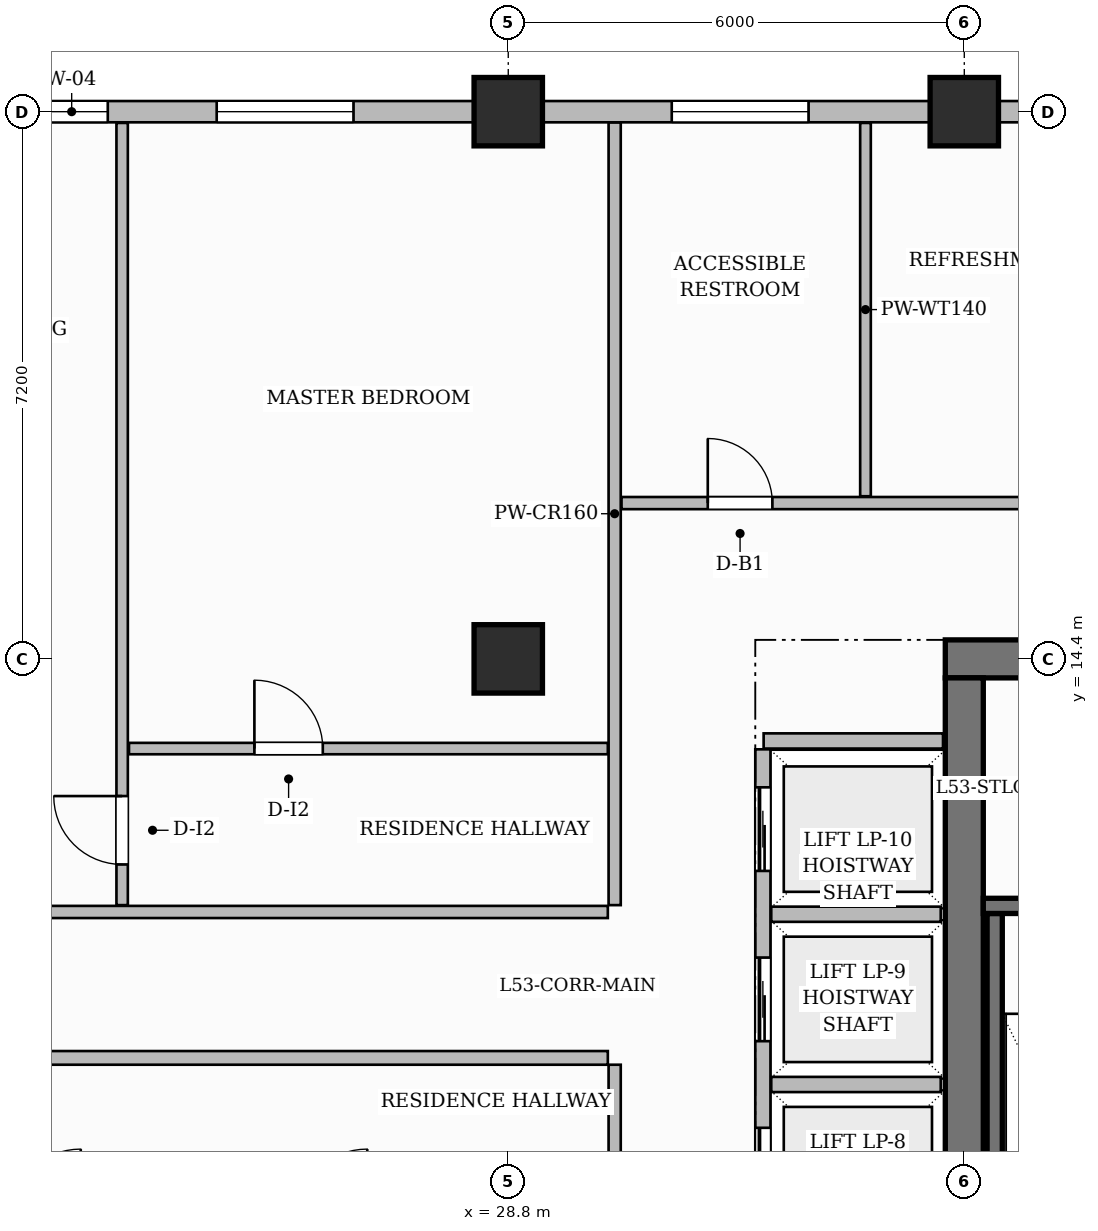
"""IFC4 building model, lengths in metres.
Left out: names, types, materials, properties, quantities, classifications, styles, units other than length and angle.
Written with IfcOpenShell. Run it as: python <this file> out.ifc"""

import sys

from ifc_helpers import new_model, si_unit, direction, frame, frame_2d, origin, origin_2d, place, context, subcontext, project, spatial, rectangle, extrude, source, transform, mapped, element, fill, save


model = new_model("IFC4")
c1 = context("Model", 3, precision=1e-05, world=origin(), true_north=direction((0.0, 1.0)))
c2 = subcontext(c1, "Body", "Model", "MODEL_VIEW")
j1 = project(units=[si_unit("LENGTHUNIT", "METRE"), si_unit("PLANEANGLEUNIT", "RADIAN")], contexts=[c1])
p1 = place(None, origin())
s1 = spatial("IfcSite", under=j1, at=p1, CompositionType="ELEMENT")
p2 = place(p1, origin())
s2 = spatial("IfcBuilding", under=s1, at=p2, CompositionType="ELEMENT")
p3 = place(p2, frame((0.0, 0.0, 213.45)))
s3 = spatial("IfcBuildingStorey", under=s2, at=p3, CompositionType="ELEMENT", Elevation=213.45)
p4 = place(p3, frame((34.55, 14.4, 0.0), z_axis=(0.0, 0.0, 1.0), x_axis=(1.0, 0.0, 0.0)))
e1 = element("IfcWall", 1, at=p4, inside=s3, PredefinedType="SHEAR", context=c2, shape_type="SweptSolid", body=[
    extrude(rectangle(XDim=15.5, YDim=0.5, at=frame_2d((7.75, 0.0))), origin(), (0.0, 0.0, 1.0), 3.85),
])
p5 = place(p4, frame((5.38, 0.0, 0.0)))
e2 = element("IfcOpeningElement", 2, at=p5, cuts=e1, PredefinedType="OPENING", context=c2, shape_type="SweptSolid", body=[
    extrude(rectangle(XDim=1.5, YDim=2.2, at=frame_2d((0.75, 1.1))), frame((0.0, 0.26, 0.0), z_axis=(0.0, -1.0, 0.0), x_axis=(1.0, 0.0, 0.0)), (0.0, 0.0, 1.0), 0.52),
])
p6 = place(p4, frame((1.595, 0.0, 0.0)))
e3 = element("IfcOpeningElement", 3, at=p6, cuts=e1, PredefinedType="OPENING", context=c2, shape_type="SweptSolid", body=[
    extrude(rectangle(XDim=1.05, YDim=2.15, at=frame_2d((0.525, 1.075))), frame((0.0, 0.26, 0.0), z_axis=(0.0, -1.0, 0.0), x_axis=(1.0, 0.0, 0.0)), (0.0, 0.0, 1.0), 0.52),
])
p7 = place(p4, frame((11.225, 0.0, 0.0)))
e4 = element("IfcOpeningElement", 4, at=p7, cuts=e1, PredefinedType="OPENING", context=c2, shape_type="SweptSolid", body=[
    extrude(rectangle(XDim=1.05, YDim=2.15, at=frame_2d((0.525, 1.075))), frame((0.0, 0.26, 0.0), z_axis=(0.0, -1.0, 0.0), x_axis=(1.0, 0.0, 0.0)), (0.0, 0.0, 1.0), 0.52),
])
p8 = place(p3, frame((34.8, 3.85, 0.0), z_axis=(0.0, 0.0, 1.0), x_axis=(0.0, 1.0, 0.0)))
e5 = element("IfcWall", 5, at=p8, inside=s3, PredefinedType="SHEAR", context=c2, shape_type="SweptSolid", body=[
    extrude(rectangle(XDim=10.3, YDim=0.5, at=frame_2d((5.15, 0.0))), origin(), (0.0, 0.0, 1.0), 3.85),
])
m1 = source(origin(), c2, "Body", "SweptSolid", [
    extrude(rectangle(XDim=0.9, YDim=0.9, at=origin_2d()), origin(), (0.0, 0.0, 1.0), 3.85),
])
for number, where, z_axis, x_axis in (
    (6, (28.8, 14.4, 0.0), (0.0, 0.0, 1.0), (1.0, 0.0, 0.0)),
    (7, (28.8, 21.6, 0.0), (0.0, 0.0, 1.0), (1.0, 0.0, 0.0)),
    (8, (34.8, 21.6, 0.0), (0.0, 0.0, 1.0), (1.0, 0.0, 0.0)),
):
    element("IfcColumn", number, at=place(p3, frame(where, z_axis=z_axis, x_axis=x_axis)), inside=s3, PredefinedType="COLUMN", context=c2, shape_type="MappedRepresentation", body=[
        mapped(m1, transform((0.0, 0.0, 0.0), scale=1.0)),
    ])
p9 = place(p3, frame((35.2, 4.1, 0.0), z_axis=(0.0, 0.0, 1.0), x_axis=(0.0, 1.0, 0.0)))
e9 = element("IfcWall", 9, at=p9, inside=s3, PredefinedType="SHEAR", context=c2, shape_type="SweptSolid", body=[
    extrude(rectangle(XDim=6.95, YDim=0.2, at=frame_2d((3.475, 0.0))), origin(), (0.0, 0.0, 1.0), 3.85),
])
p10 = place(p3, frame((35.05, 11.15, 0.0), z_axis=(0.0, 0.0, 1.0), x_axis=(1.0, 0.0, 0.0)))
e10 = element("IfcWall", 10, at=p10, inside=s3, PredefinedType="SHEAR", context=c2, shape_type="SweptSolid", body=[
    extrude(rectangle(XDim=3.19, YDim=0.2, at=frame_2d((1.595, 0.0))), origin(), (0.0, 0.0, 1.0), 3.85),
])
p11 = place(p10, frame((1.095, 0.0, 0.0)))
e11 = element("IfcOpeningElement", 11, at=p11, cuts=e10, PredefinedType="OPENING", context=c2, shape_type="SweptSolid", body=[
    extrude(rectangle(XDim=1.05, YDim=2.2, at=frame_2d((0.525, 1.1))), frame((0.0, 0.11, 0.0), z_axis=(0.0, -1.0, 0.0), x_axis=(1.0, 0.0, 0.0)), (0.0, 0.0, 1.0), 0.22),
])
p12 = place(p3, frame((32.16, 13.32, 0.0), z_axis=(0.0, 0.0, 1.0), x_axis=(1.0, 0.0, 0.0)))
e12 = element("IfcWall", 12, at=p12, inside=s3, PredefinedType="PARTITIONING", context=c2, shape_type="SweptSolid", body=[
    extrude(rectangle(XDim=2.36, YDim=0.2, at=frame_2d((1.18, 0.0))), origin(), (0.0, 0.0, 1.0), 3.6),
])
p13 = place(p3, frame((32.15, 4.39, 0.0), z_axis=(0.0, 0.0, 1.0), x_axis=(0.0, 1.0, 0.0)))
e13 = element("IfcWall", 13, at=p13, inside=s3, PredefinedType="PARTITIONING", context=c2, shape_type="SweptSolid", body=[
    extrude(rectangle(XDim=8.82, YDim=0.2, at=frame_2d((4.41, 0.0))), origin(), (0.0, 0.0, 1.0), 3.6),
])
p14 = place(p13, frame((0.5, 0.0, 0.0)))
e14 = element("IfcOpeningElement", 14, at=p14, cuts=e13, PredefinedType="OPENING", context=c2, shape_type="SweptSolid", body=[
    extrude(rectangle(XDim=1.1, YDim=2.2, at=frame_2d((0.55, 1.1))), frame((0.0, 0.11, 0.0), z_axis=(0.0, -1.0, 0.0), x_axis=(1.0, 0.0, 0.0)), (0.0, 0.0, 1.0), 0.22),
])
p15 = place(p13, frame((2.74, 0.0, 0.0)))
e15 = element("IfcOpeningElement", 15, at=p15, cuts=e13, PredefinedType="OPENING", context=c2, shape_type="SweptSolid", body=[
    extrude(rectangle(XDim=1.1, YDim=2.2, at=frame_2d((0.55, 1.1))), frame((0.0, 0.11, 0.0), z_axis=(0.0, -1.0, 0.0), x_axis=(1.0, 0.0, 0.0)), (0.0, 0.0, 1.0), 0.22),
])
p16 = place(p13, frame((4.98, 0.0, 0.0)))
e16 = element("IfcOpeningElement", 16, at=p16, cuts=e13, PredefinedType="OPENING", context=c2, shape_type="SweptSolid", body=[
    extrude(rectangle(XDim=1.1, YDim=2.2, at=frame_2d((0.55, 1.1))), frame((0.0, 0.11, 0.0), z_axis=(0.0, -1.0, 0.0), x_axis=(1.0, 0.0, 0.0)), (0.0, 0.0, 1.0), 0.22),
])
p17 = place(p13, frame((7.22, 0.0, 0.0)))
e17 = element("IfcOpeningElement", 17, at=p17, cuts=e13, PredefinedType="OPENING", context=c2, shape_type="SweptSolid", body=[
    extrude(rectangle(XDim=1.1, YDim=2.2, at=frame_2d((0.55, 1.1))), frame((0.0, 0.11, 0.0), z_axis=(0.0, -1.0, 0.0), x_axis=(1.0, 0.0, 0.0)), (0.0, 0.0, 1.0), 0.22),
])
for number, where, z_axis, x_axis in (
    (18, (32.26, 8.8, 0.0), (0.0, 0.0, 1.0), (1.0, 0.0, 0.0)),
    (19, (32.26, 11.04, 0.0), (0.0, 0.0, 1.0), (1.0, 0.0, 0.0)),
):
    element("IfcWall", number, at=place(p3, frame(where, z_axis=z_axis, x_axis=x_axis)), inside=s3, PredefinedType="PARTITIONING", context=c2, shape_type="SweptSolid", body=[
        extrude(rectangle(XDim=2.23, YDim=0.2, at=frame_2d((1.115, 0.0))), origin(), (0.0, 0.0, 1.0), 3.6),
    ])
p18 = place(p3, frame((14.548, 9.15, 0.0), z_axis=(0.0, 0.0, 1.0), x_axis=(1.0, 0.0, 0.0)))
e20 = element("IfcWall", 20, at=p18, inside=s3, PredefinedType="PARTITIONING", context=c2, shape_type="SweptSolid", body=[
    extrude(rectangle(XDim=15.562, YDim=0.18, at=frame_2d((7.781, 0.0))), origin(), (0.0, 0.0, 1.0), 3.6),
])
p19 = place(p18, frame((3.082, 0.0, 0.0)))
e21 = element("IfcOpeningElement", 21, at=p19, cuts=e20, PredefinedType="OPENING", context=c2, shape_type="SweptSolid", body=[
    extrude(rectangle(XDim=1.05, YDim=2.25, at=frame_2d((0.525, 1.125))), frame((0.0, 0.1, 0.0), z_axis=(0.0, -1.0, 0.0), x_axis=(1.0, 0.0, 0.0)), (0.0, 0.0, 1.0), 0.2),
])
p20 = place(p3, frame((14.548, 11.07, 0.0), z_axis=(0.0, 0.0, 1.0), x_axis=(1.0, 0.0, 0.0)))
e22 = element("IfcWall", 22, at=p20, inside=s3, PredefinedType="PARTITIONING", context=c2, shape_type="SweptSolid", body=[
    extrude(rectangle(XDim=15.562, YDim=0.16, at=frame_2d((7.781, 0.0))), origin(), (0.0, 0.0, 1.0), 3.6),
])
p21 = place(p20, frame((0.527, 0.0, 0.0)))
e23 = element("IfcOpeningElement", 23, at=p21, cuts=e22, PredefinedType="OPENING", context=c2, shape_type="SweptSolid", body=[
    extrude(rectangle(XDim=1.4, YDim=2.35, at=frame_2d((0.7, 1.175))), frame((0.0, 0.09, 0.0), z_axis=(0.0, -1.0, 0.0), x_axis=(1.0, 0.0, 0.0)), (0.0, 0.0, 1.0), 0.18),
])
p22 = place(p20, frame((6.527, 0.0, 0.0)))
e24 = element("IfcOpeningElement", 24, at=p22, cuts=e22, PredefinedType="OPENING", context=c2, shape_type="SweptSolid", body=[
    extrude(rectangle(XDim=1.05, YDim=2.25, at=frame_2d((0.525, 1.125))), frame((0.0, 0.09, 0.0), z_axis=(0.0, -1.0, 0.0), x_axis=(1.0, 0.0, 0.0)), (0.0, 0.0, 1.0), 0.18),
])
p23 = place(p3, frame((30.2, 11.16, 0.0), z_axis=(0.0, 0.0, 1.0), x_axis=(0.0, 1.0, 0.0)))
e25 = element("IfcWall", 25, at=p23, inside=s3, PredefinedType="PARTITIONING", context=c2, shape_type="SweptSolid", body=[
    extrude(rectangle(XDim=10.3, YDim=0.16, at=frame_2d((5.15, 0.0))), origin(), (0.0, 0.0, 1.0), 3.6),
])
p24 = place(p3, frame((30.29, 16.45, 0.0), z_axis=(0.0, 0.0, 1.0), x_axis=(1.0, 0.0, 0.0)))
e26 = element("IfcWall", 26, at=p24, inside=s3, PredefinedType="PARTITIONING", context=c2, shape_type="SweptSolid", body=[
    extrude(rectangle(XDim=19.37, YDim=0.16, at=frame_2d((9.685, 0.0))), origin(), (0.0, 0.0, 1.0), 3.6),
])
p25 = place(p24, frame((1.135, 0.0, 0.0)))
e27 = element("IfcOpeningElement", 27, at=p25, cuts=e26, PredefinedType="OPENING", context=c2, shape_type="SweptSolid", body=[
    extrude(rectangle(XDim=0.85, YDim=2.1, at=frame_2d((0.425, 1.05))), frame((0.0, 0.09, 0.0), z_axis=(0.0, -1.0, 0.0), x_axis=(1.0, 0.0, 0.0)), (0.0, 0.0, 1.0), 0.18),
])
p26 = place(p24, frame((5.71, 0.0, 0.0)))
e28 = element("IfcOpeningElement", 28, at=p26, cuts=e26, PredefinedType="OPENING", context=c2, shape_type="SweptSolid", body=[
    extrude(rectangle(XDim=0.9, YDim=2.15, at=frame_2d((0.45, 1.075))), frame((0.0, 0.09, 0.0), z_axis=(0.0, -1.0, 0.0), x_axis=(1.0, 0.0, 0.0)), (0.0, 0.0, 1.0), 0.18),
])
p27 = place(p24, frame((10.635, 0.0, 0.0)))
e29 = element("IfcOpeningElement", 29, at=p27, cuts=e26, PredefinedType="OPENING", context=c2, shape_type="SweptSolid", body=[
    extrude(rectangle(XDim=0.95, YDim=2.15, at=frame_2d((0.475, 1.075))), frame((0.0, 0.09, 0.0), z_axis=(0.0, -1.0, 0.0), x_axis=(1.0, 0.0, 0.0)), (0.0, 0.0, 1.0), 0.18),
])
p28 = place(p24, frame((16.235, 0.0, 0.0)))
e30 = element("IfcOpeningElement", 30, at=p28, cuts=e26, PredefinedType="OPENING", context=c2, shape_type="SweptSolid", body=[
    extrude(rectangle(XDim=0.95, YDim=2.15, at=frame_2d((0.475, 1.075))), frame((0.0, 0.09, 0.0), z_axis=(0.0, -1.0, 0.0), x_axis=(1.0, 0.0, 0.0)), (0.0, 0.0, 1.0), 0.18),
])
p29 = place(p3, frame((30.2, 0.148, 0.0), z_axis=(0.0, 0.0, 1.0), x_axis=(0.0, 1.0, 0.0)))
e31 = element("IfcWall", 31, at=p29, inside=s3, PredefinedType="PARTITIONING", context=c2, shape_type="SweptSolid", body=[
    extrude(rectangle(XDim=8.912, YDim=0.16, at=frame_2d((4.456, 0.0))), origin(), (0.0, 0.0, 1.0), 3.6),
])
p30 = place(p29, frame((1.977, 0.0, 0.0)))
e32 = element("IfcOpeningElement", 32, at=p30, cuts=e31, PredefinedType="OPENING", context=c2, shape_type="SweptSolid", body=[
    extrude(rectangle(XDim=1.05, YDim=2.15, at=frame_2d((0.525, 1.075))), frame((0.0, 0.09, 0.0), z_axis=(0.0, -1.0, 0.0), x_axis=(1.0, 0.0, 0.0)), (0.0, 0.0, 1.0), 0.18),
])
p31 = place(p3, frame((33.5, 16.54, 0.0), z_axis=(0.0, 0.0, 1.0), x_axis=(0.0, 1.0, 0.0)))
e33 = element("IfcWall", 33, at=p31, inside=s3, PredefinedType="PARTITIONING", context=c2, shape_type="SweptSolid", body=[
    extrude(rectangle(XDim=4.912, YDim=0.14, at=frame_2d((2.456, 0.0))), origin(), (0.0, 0.0, 1.0), 3.6),
])
p32 = place(p3, frame((23.72, 11.16, 0.0), z_axis=(0.0, 0.0, 1.0), x_axis=(0.0, 1.0, 0.0)))
e34 = element("IfcWall", 34, at=p32, inside=s3, PredefinedType="PARTITIONING", context=c2, shape_type="SweptSolid", body=[
    extrude(rectangle(XDim=10.292, YDim=0.15, at=frame_2d((5.146, 0.0))), origin(), (0.0, 0.0, 1.0), 3.6),
])
p33 = place(p32, frame((0.535, 0.0, 0.0)))
e35 = element("IfcOpeningElement", 35, at=p33, cuts=e34, PredefinedType="OPENING", context=c2, shape_type="SweptSolid", body=[
    extrude(rectangle(XDim=0.9, YDim=2.15, at=frame_2d((0.45, 1.075))), frame((0.0, 0.085, 0.0), z_axis=(0.0, -1.0, 0.0), x_axis=(1.0, 0.0, 0.0)), (0.0, 0.0, 1.0), 0.17),
])
p34 = place(p3, frame((23.81, 13.22, 0.0), z_axis=(0.0, 0.0, 1.0), x_axis=(1.0, 0.0, 0.0)))
e36 = element("IfcWall", 36, at=p34, inside=s3, PredefinedType="PARTITIONING", context=c2, shape_type="SweptSolid", body=[
    extrude(rectangle(XDim=6.3, YDim=0.15, at=frame_2d((3.15, 0.0))), origin(), (0.0, 0.0, 1.0), 3.6),
])
p35 = place(p34, frame((1.65, 0.0, 0.0)))
e37 = element("IfcOpeningElement", 37, at=p35, cuts=e36, PredefinedType="OPENING", context=c2, shape_type="SweptSolid", body=[
    extrude(rectangle(XDim=0.9, YDim=2.15, at=frame_2d((0.45, 1.075))), frame((0.0, 0.085, 0.0), z_axis=(0.0, -1.0, 0.0), x_axis=(1.0, 0.0, 0.0)), (0.0, 0.0, 1.0), 0.17),
])
p36 = place(p3, frame((14.4, 21.6, 0.0), z_axis=(0.0, 0.0, 1.0), x_axis=(1.0, 0.0, 0.0)))
e38 = element("IfcWall", 38, at=p36, inside=s3, PredefinedType="SOLIDWALL", context=c2, shape_type="SweptSolid", body=[
    extrude(rectangle(XDim=35.4, YDim=0.28, at=frame_2d((17.7, 0.0))), origin(), (0.0, 0.0, 1.0), 3.135),
])
p37 = place(p36, frame((1.196, 0.0, 0.8)))
e39 = element("IfcOpeningElement", 39, at=p37, cuts=e38, PredefinedType="OPENING", context=c2, shape_type="SweptSolid", body=[
    extrude(rectangle(XDim=1.15, YDim=1.8, at=frame_2d((0.575, 0.9))), frame((0.0, 0.15, 0.0), z_axis=(0.0, -1.0, 0.0), x_axis=(1.0, 0.0, 0.0)), (0.0, 0.0, 1.0), 0.3),
])
p38 = place(p36, frame((3.679, 0.0, 0.8)))
e40 = element("IfcOpeningElement", 40, at=p38, cuts=e38, PredefinedType="OPENING", context=c2, shape_type="SweptSolid", body=[
    extrude(rectangle(XDim=1.8, YDim=1.85, at=frame_2d((0.9, 0.925))), frame((0.0, 0.15, 0.0), z_axis=(0.0, -1.0, 0.0), x_axis=(1.0, 0.0, 0.0)), (0.0, 0.0, 1.0), 0.3),
])
p39 = place(p36, frame((8.181, 0.0, 0.8)))
e41 = element("IfcOpeningElement", 41, at=p39, cuts=e38, PredefinedType="OPENING", context=c2, shape_type="SweptSolid", body=[
    extrude(rectangle(XDim=0.95, YDim=1.75, at=frame_2d((0.475, 0.875))), frame((0.0, 0.15, 0.0), z_axis=(0.0, -1.0, 0.0), x_axis=(1.0, 0.0, 0.0)), (0.0, 0.0, 1.0), 0.3),
])
p40 = place(p36, frame((10.564, 0.0, 0.8)))
e42 = element("IfcOpeningElement", 42, at=p40, cuts=e38, PredefinedType="OPENING", context=c2, shape_type="SweptSolid", body=[
    extrude(rectangle(XDim=1.8, YDim=1.85, at=frame_2d((0.9, 0.925))), frame((0.0, 0.15, 0.0), z_axis=(0.0, -1.0, 0.0), x_axis=(1.0, 0.0, 0.0)), (0.0, 0.0, 1.0), 0.3),
])
p41 = place(p36, frame((16.551, 0.0, 0.8)))
e43 = element("IfcOpeningElement", 43, at=p41, cuts=e38, PredefinedType="OPENING", context=c2, shape_type="SweptSolid", body=[
    extrude(rectangle(XDim=1.8, YDim=1.85, at=frame_2d((0.9, 0.925))), frame((0.0, 0.15, 0.0), z_axis=(0.0, -1.0, 0.0), x_axis=(1.0, 0.0, 0.0)), (0.0, 0.0, 1.0), 0.3),
])
p42 = place(p36, frame((22.196, 0.0, 0.8)))
e44 = element("IfcOpeningElement", 44, at=p42, cuts=e38, PredefinedType="OPENING", context=c2, shape_type="SweptSolid", body=[
    extrude(rectangle(XDim=1.8, YDim=1.85, at=frame_2d((0.9, 0.925))), frame((0.0, 0.15, 0.0), z_axis=(0.0, -1.0, 0.0), x_axis=(1.0, 0.0, 0.0)), (0.0, 0.0, 1.0), 0.3),
])
p43 = place(p36, frame((25.329, 0.0, 0.8)))
e45 = element("IfcOpeningElement", 45, at=p43, cuts=e38, PredefinedType="OPENING", context=c2, shape_type="SweptSolid", body=[
    extrude(rectangle(XDim=1.15, YDim=1.8, at=frame_2d((0.575, 0.9))), frame((0.0, 0.15, 0.0), z_axis=(0.0, -1.0, 0.0), x_axis=(1.0, 0.0, 0.0)), (0.0, 0.0, 1.0), 0.3),
])
p44 = place(p36, frame((28.721, 0.0, 0.8)))
e46 = element("IfcOpeningElement", 46, at=p44, cuts=e38, PredefinedType="OPENING", context=c2, shape_type="SweptSolid", body=[
    extrude(rectangle(XDim=0.95, YDim=1.75, at=frame_2d((0.475, 0.875))), frame((0.0, 0.15, 0.0), z_axis=(0.0, -1.0, 0.0), x_axis=(1.0, 0.0, 0.0)), (0.0, 0.0, 1.0), 0.3),
])
p45 = place(p36, frame((31.404, 0.0, 0.8)))
e47 = element("IfcOpeningElement", 47, at=p45, cuts=e38, PredefinedType="OPENING", context=c2, shape_type="SweptSolid", body=[
    extrude(rectangle(XDim=1.8, YDim=1.85, at=frame_2d((0.9, 0.925))), frame((0.0, 0.15, 0.0), z_axis=(0.0, -1.0, 0.0), x_axis=(1.0, 0.0, 0.0)), (0.0, 0.0, 1.0), 0.3),
])
m2 = source(origin(), c2, "Body", "SweptSolid", [
    extrude(rectangle(XDim=0.85, YDim=2.1, at=frame_2d((0.425, 1.05))), frame((0.0, 0.025, 0.0), z_axis=(0.0, -1.0, 0.0), x_axis=(1.0, 0.0, 0.0)), (0.0, 0.0, 1.0), 0.05),
])
p46 = place(p25, origin())
e48 = element("IfcDoor", 48, at=p46, inside=s3, OperationType="SINGLE_SWING_LEFT", PredefinedType="DOOR", context=c2, shape_type="MappedRepresentation", body=[
    mapped(m2, transform((0.0, 0.0, 0.0), scale=1.0)),
])
fill(e27, e48)
m3 = source(origin(), c2, "Body", "SweptSolid", [
    extrude(rectangle(XDim=0.9, YDim=2.15, at=frame_2d((0.45, 1.075))), frame((0.0, 0.025, 0.0), z_axis=(0.0, -1.0, 0.0), x_axis=(1.0, 0.0, 0.0)), (0.0, 0.0, 1.0), 0.05),
])
p47 = place(p33, origin())
e49 = element("IfcDoor", 49, at=p47, inside=s3, OperationType="SINGLE_SWING_RIGHT", PredefinedType="DOOR", context=c2, shape_type="MappedRepresentation", body=[
    mapped(m3, transform((0.0, 0.0, 0.0), scale=1.0)),
])
fill(e35, e49)
p48 = place(p35, origin())
e50 = element("IfcDoor", 50, at=p48, inside=s3, OperationType="SINGLE_SWING_LEFT", PredefinedType="DOOR", context=c2, shape_type="MappedRepresentation", body=[
    mapped(m3, transform((0.0, 0.0, 0.0), scale=1.0)),
])
fill(e37, e50)
m4 = source(origin(), c2, "Body", "SweptSolid", [
    extrude(rectangle(XDim=1.1, YDim=2.2, at=frame_2d((0.55, 1.1))), frame((0.0, 0.025, 0.0), z_axis=(0.0, -1.0, 0.0), x_axis=(1.0, 0.0, 0.0)), (0.0, 0.0, 1.0), 0.05),
])
p49 = place(p15, origin())
e51 = element("IfcDoor", 51, at=p49, inside=s3, OperationType="SLIDING_TO_LEFT", PredefinedType="DOOR", context=c2, shape_type="MappedRepresentation", body=[
    mapped(m4, transform((0.0, 0.0, 0.0), scale=1.0)),
])
fill(e15, e51)
p50 = place(p16, origin())
e52 = element("IfcDoor", 52, at=p50, inside=s3, OperationType="SLIDING_TO_LEFT", PredefinedType="DOOR", context=c2, shape_type="MappedRepresentation", body=[
    mapped(m4, transform((0.0, 0.0, 0.0), scale=1.0)),
])
fill(e16, e52)
p51 = place(p17, origin())
e53 = element("IfcDoor", 53, at=p51, inside=s3, OperationType="SLIDING_TO_LEFT", PredefinedType="DOOR", context=c2, shape_type="MappedRepresentation", body=[
    mapped(m4, transform((0.0, 0.0, 0.0), scale=1.0)),
])
fill(e17, e53)
m5 = source(origin(), c2, "Body", "SweptSolid", [
    extrude(rectangle(XDim=0.95, YDim=1.75, at=frame_2d((0.475, 0.875))), frame((0.0, 0.03, 0.0), z_axis=(0.0, -1.0, 0.0), x_axis=(1.0, 0.0, 0.0)), (0.0, 0.0, 1.0), 0.06),
])
p52 = place(p39, origin())
e54 = element("IfcWindow", 54, at=p52, inside=s3, PartitioningType="SINGLE_PANEL", PredefinedType="WINDOW", context=c2, shape_type="MappedRepresentation", body=[
    mapped(m5, transform((0.0, 0.0, 0.0), scale=1.0)),
])
fill(e41, e54)
m6 = source(origin(), c2, "Body", "SweptSolid", [
    extrude(rectangle(XDim=1.8, YDim=1.85, at=frame_2d((0.9, 0.925))), frame((0.0, 0.03, 0.0), z_axis=(0.0, -1.0, 0.0), x_axis=(1.0, 0.0, 0.0)), (0.0, 0.0, 1.0), 0.06),
])
p53 = place(p40, origin())
e55 = element("IfcWindow", 55, at=p53, inside=s3, PartitioningType="DOUBLE_PANEL_VERTICAL", PredefinedType="WINDOW", context=c2, shape_type="MappedRepresentation", body=[
    mapped(m6, transform((0.0, 0.0, 0.0), scale=1.0)),
])
fill(e42, e55)
p54 = place(p41, origin())
e56 = element("IfcWindow", 56, at=p54, inside=s3, PartitioningType="DOUBLE_PANEL_VERTICAL", PredefinedType="WINDOW", context=c2, shape_type="MappedRepresentation", body=[
    mapped(m6, transform((0.0, 0.0, 0.0), scale=1.0)),
])
fill(e43, e56)
save(model, sys.argv[1])
